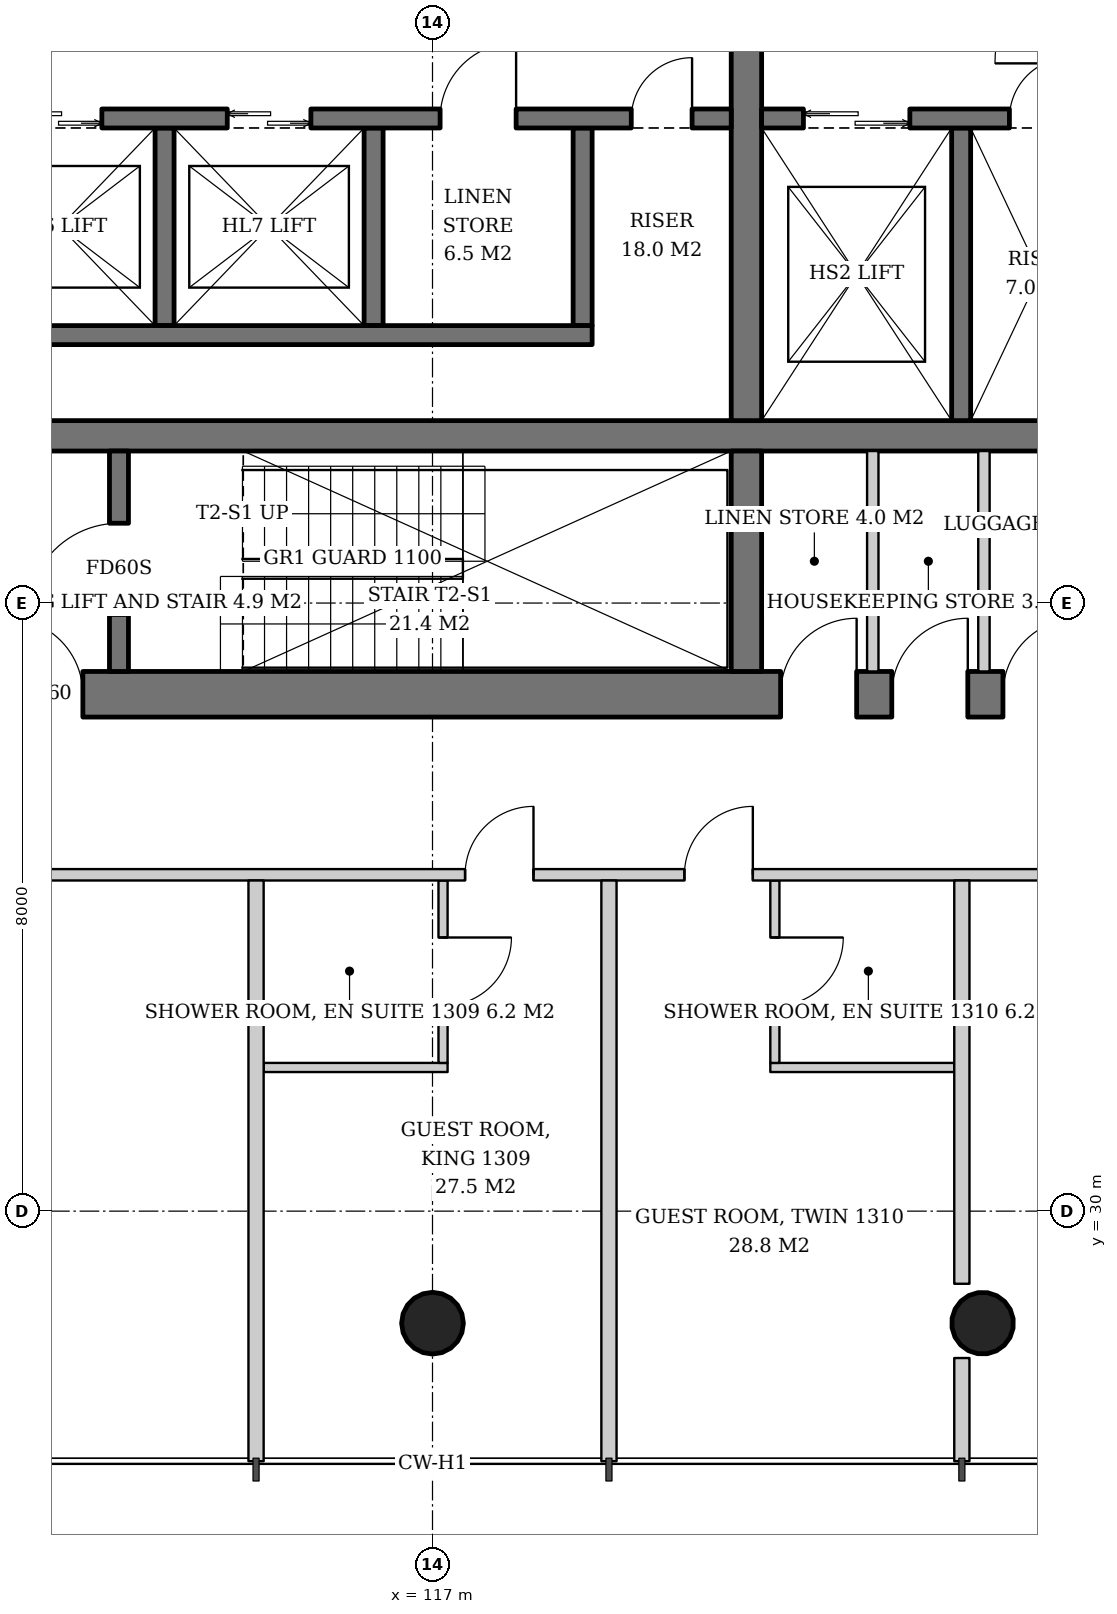
"""IFC4 building model, lengths in metres.
Left out: names, types, materials, properties, quantities, classifications, styles, units other than length and angle.
Written with IfcOpenShell. Run it as: python <this file> out.ifc"""

import sys

from ifc_helpers import new_model, si_unit, direction, frame, frame_2d, origin, origin_2d, place, context, subcontext, project, spatial, rectangle, hollow_circle, extrude, element, fill, save


model = new_model("IFC4")
c1 = context("Model", 3, precision=1e-05, world=origin(), true_north=direction((0.0, 1.0)))
c2 = subcontext(c1, "Body", "Model", "MODEL_VIEW")
j1 = project(units=[si_unit("LENGTHUNIT", "METRE"), si_unit("PLANEANGLEUNIT", "RADIAN")], contexts=[c1])
p1 = place(None, origin())
s1 = spatial("IfcSite", under=j1, at=p1, CompositionType="ELEMENT")
p2 = place(p1, origin())
s2 = spatial("IfcBuilding", under=s1, at=p2, CompositionType="ELEMENT")
p3 = place(p2, frame((0.0, 0.0, 55.2)))
s3 = spatial("IfcBuildingStorey", under=s2, at=p3, CompositionType="ELEMENT", Elevation=55.2)
p4 = place(p3, frame((117.0, 28.474, 0.0), z_axis=(0.0, 0.043069538298, 0.999072076915), x_axis=(-1.0, 0.0, 0.0)))
e1 = element("IfcColumn", 1, at=p4, inside=s3, PredefinedType="COLUMN", context=c2, shape_type="SweptSolid", body=[
    extrude(hollow_circle(Radius=0.406, WallThickness=0.03, at=origin_2d()), origin(), (0.0, 0.0, 1.0), 3.803),
])
p5 = place(p3, frame((124.263, 28.474, 0.0), z_axis=(-0.021497706284, 0.043059584825, 0.998841188968), x_axis=(-0.894693706707, -0.446680166538, 0.0)))
e2 = element("IfcColumn", 2, at=p5, inside=s3, PredefinedType="COLUMN", context=c2, shape_type="SweptSolid", body=[
    extrude(hollow_circle(Radius=0.406, WallThickness=0.03, at=origin_2d()), origin(), (0.0, 0.0, 1.0), 3.804),
])
p6 = place(p3, frame((107.5, 36.8, 0.0), z_axis=(0.0, 0.0, 1.0), x_axis=(1.0, 0.0, 0.0)))
e3 = element("IfcWall", 3, at=p6, inside=s3, PredefinedType="SHEAR", context=c2, shape_type="SweptSolid", body=[
    extrude(rectangle(XDim=19.0, YDim=0.6, at=frame_2d((9.5, 0.0))), origin(), (0.0, 0.0, 1.0), 3.8),
])
p7 = place(p6, frame((3.9, 0.0, 0.0)))
e4 = element("IfcOpeningElement", 4, at=p7, cuts=e3, PredefinedType="OPENING", context=c2, shape_type="SweptSolid", body=[
    extrude(rectangle(XDim=1.0, YDim=2.1, at=frame_2d((0.5, 1.05))), frame((0.0, 0.31, 0.0), z_axis=(0.0, -1.0, 0.0), x_axis=(1.0, 0.0, 0.0)), (0.0, 0.0, 1.0), 0.62),
])
p8 = place(p6, frame((14.08, 0.0, 0.0)))
e5 = element("IfcOpeningElement", 5, at=p8, cuts=e3, PredefinedType="OPENING", context=c2, shape_type="SweptSolid", body=[
    extrude(rectangle(XDim=1.0, YDim=2.1, at=frame_2d((0.5, 1.05))), frame((0.0, 0.31, 0.0), z_axis=(0.0, -1.0, 0.0), x_axis=(1.0, 0.0, 0.0)), (0.0, 0.0, 1.0), 0.62),
])
p9 = place(p6, frame((15.542, 0.0, 0.0)))
e6 = element("IfcOpeningElement", 6, at=p9, cuts=e3, PredefinedType="OPENING", context=c2, shape_type="SweptSolid", body=[
    extrude(rectangle(XDim=1.0, YDim=2.1, at=frame_2d((0.5, 1.05))), frame((0.0, 0.31, 0.0), z_axis=(0.0, -1.0, 0.0), x_axis=(1.0, 0.0, 0.0)), (0.0, 0.0, 1.0), 0.62),
])
p10 = place(p6, frame((17.005, 0.0, 0.0)))
e7 = element("IfcOpeningElement", 7, at=p10, cuts=e3, PredefinedType="OPENING", context=c2, shape_type="SweptSolid", body=[
    extrude(rectangle(XDim=1.0, YDim=2.1, at=frame_2d((0.5, 1.05))), frame((0.0, 0.31, 0.0), z_axis=(0.0, -1.0, 0.0), x_axis=(1.0, 0.0, 0.0)), (0.0, 0.0, 1.0), 0.62),
])
p11 = place(p3, frame((108.1, 40.2, 0.0), z_axis=(0.0, 0.0, 1.0), x_axis=(1.0, 0.0, 0.0)))
e8 = element("IfcWall", 8, at=p11, inside=s3, PredefinedType="SHEAR", context=c2, shape_type="SweptSolid", body=[
    extrude(rectangle(XDim=17.8, YDim=0.4, at=frame_2d((8.9, 0.0))), origin(), (0.0, 0.0, 1.0), 3.8),
])
p12 = place(p3, frame((121.13, 37.1, 0.0), z_axis=(0.0, 0.0, 1.0), x_axis=(0.0, 1.0, 0.0)))
e9 = element("IfcWall", 9, at=p12, inside=s3, PredefinedType="SHEAR", context=c2, shape_type="SweptSolid", body=[
    extrude(rectangle(XDim=2.9, YDim=0.4, at=frame_2d((1.45, 0.0))), origin(), (0.0, 0.0, 1.0), 3.8),
])
p13 = place(p3, frame((121.13, 40.4, 0.0), z_axis=(0.0, 0.0, 1.0), x_axis=(0.0, 1.0, 0.0)))
e10 = element("IfcWall", 10, at=p13, inside=s3, PredefinedType="SHEAR", context=c2, shape_type="SweptSolid", body=[
    extrude(rectangle(XDim=11.2, YDim=0.4, at=frame_2d((5.6, 0.0))), origin(), (0.0, 0.0, 1.0), 3.8),
])
p14 = place(p3, frame((112.875, 37.1, 0.0), z_axis=(0.0, 0.0, 1.0), x_axis=(0.0, 1.0, 0.0)))
e11 = element("IfcWall", 11, at=p14, inside=s3, PredefinedType="SHEAR", context=c2, shape_type="SweptSolid", body=[
    extrude(rectangle(XDim=2.9, YDim=0.25, at=frame_2d((1.45, 0.0))), origin(), (0.0, 0.0, 1.0), 3.8),
])
p15 = place(p14, frame((0.75, 0.0, 0.0)))
e12 = element("IfcOpeningElement", 12, at=p15, cuts=e11, PredefinedType="OPENING", context=c2, shape_type="SweptSolid", body=[
    extrude(rectangle(XDim=1.2, YDim=2.1, at=frame_2d((0.6, 1.05))), frame((0.0, 0.135, 0.0), z_axis=(0.0, -1.0, 0.0), x_axis=(1.0, 0.0, 0.0)), (0.0, 0.0, 1.0), 0.27),
])
for number, where, z_axis, x_axis in (
    (13, (113.475, 44.25, 0.0), (0.0, 0.0, 1.0), (0.0, -1.0, 0.0)),
    (14, (116.225, 44.25, 0.0), (0.0, 0.0, 1.0), (0.0, -1.0, 0.0)),
    (15, (118.975, 44.25, 0.0), (0.0, 0.0, 1.0), (0.0, -1.0, 0.0)),
):
    element("IfcWall", number, at=place(p3, frame(where, z_axis=z_axis, x_axis=x_axis)), inside=s3, PredefinedType="SHEAR", context=c2, shape_type="SweptSolid", body=[
        extrude(rectangle(XDim=2.6, YDim=0.25, at=frame_2d((1.3, 0.0))), origin(), (0.0, 0.0, 1.0), 3.8),
    ])
p16 = place(p3, frame((108.1, 41.525, 0.0), z_axis=(0.0, 0.0, 1.0), x_axis=(1.0, 0.0, 0.0)))
e16 = element("IfcWall", 16, at=p16, inside=s3, PredefinedType="SHEAR", context=c2, shape_type="SweptSolid", body=[
    extrude(rectangle(XDim=11.0, YDim=0.25, at=frame_2d((5.5, 0.0))), origin(), (0.0, 0.0, 1.0), 3.8),
])
p17 = place(p3, frame((108.1, 44.375, 0.0), z_axis=(0.0, 0.0, 1.0), x_axis=(1.0, 0.0, 0.0)))
e17 = element("IfcWall", 17, at=p17, inside=s3, PredefinedType="SHEAR", context=c2, shape_type="SweptSolid", body=[
    extrude(rectangle(XDim=12.83, YDim=0.25, at=frame_2d((6.415, 0.0))), origin(), (0.0, 0.0, 1.0), 3.8),
])
p18 = place(p17, frame((0.7, 0.0, 0.0)))
e18 = element("IfcOpeningElement", 18, at=p18, cuts=e17, PredefinedType="OPENING", context=c2, shape_type="SweptSolid", body=[
    extrude(rectangle(XDim=1.1, YDim=2.2, at=frame_2d((0.55, 1.1))), frame((0.0, 0.135, 0.0), z_axis=(0.0, -1.0, 0.0), x_axis=(1.0, 0.0, 0.0)), (0.0, 0.0, 1.0), 0.27),
])
p19 = place(p17, frame((3.45, 0.0, 0.0)))
e19 = element("IfcOpeningElement", 19, at=p19, cuts=e17, PredefinedType="OPENING", context=c2, shape_type="SweptSolid", body=[
    extrude(rectangle(XDim=1.1, YDim=2.2, at=frame_2d((0.55, 1.1))), frame((0.0, 0.135, 0.0), z_axis=(0.0, -1.0, 0.0), x_axis=(1.0, 0.0, 0.0)), (0.0, 0.0, 1.0), 0.27),
])
p20 = place(p17, frame((6.2, 0.0, 0.0)))
e20 = element("IfcOpeningElement", 20, at=p20, cuts=e17, PredefinedType="OPENING", context=c2, shape_type="SweptSolid", body=[
    extrude(rectangle(XDim=1.1, YDim=2.2, at=frame_2d((0.55, 1.1))), frame((0.0, 0.135, 0.0), z_axis=(0.0, -1.0, 0.0), x_axis=(1.0, 0.0, 0.0)), (0.0, 0.0, 1.0), 0.27),
])
p21 = place(p17, frame((9.0, 0.0, 0.0)))
e21 = element("IfcOpeningElement", 21, at=p21, cuts=e17, PredefinedType="OPENING", context=c2, shape_type="SweptSolid", body=[
    extrude(rectangle(XDim=1.0, YDim=2.1, at=frame_2d((0.5, 1.05))), frame((0.0, 0.135, 0.0), z_axis=(0.0, -1.0, 0.0), x_axis=(1.0, 0.0, 0.0)), (0.0, 0.0, 1.0), 0.27),
])
p22 = place(p17, frame((11.515, 0.0, 0.0)))
e22 = element("IfcOpeningElement", 22, at=p22, cuts=e17, PredefinedType="OPENING", context=c2, shape_type="SweptSolid", body=[
    extrude(rectangle(XDim=0.8, YDim=2.0, at=frame_2d((0.4, 1.0))), frame((0.0, 0.135, 0.0), z_axis=(0.0, -1.0, 0.0), x_axis=(1.0, 0.0, 0.0)), (0.0, 0.0, 1.0), 0.27),
])
p23 = place(p3, frame((123.955, 44.25, 0.0), z_axis=(0.0, 0.0, 1.0), x_axis=(0.0, -1.0, 0.0)))
e23 = element("IfcWall", 23, at=p23, inside=s3, PredefinedType="SHEAR", context=c2, shape_type="SweptSolid", body=[
    extrude(rectangle(XDim=3.85, YDim=0.25, at=frame_2d((1.925, 0.0))), origin(), (0.0, 0.0, 1.0), 3.8),
])
p24 = place(p3, frame((121.33, 44.375, 0.0), z_axis=(0.0, 0.0, 1.0), x_axis=(1.0, 0.0, 0.0)))
e24 = element("IfcWall", 24, at=p24, inside=s3, PredefinedType="SHEAR", context=c2, shape_type="SweptSolid", body=[
    extrude(rectangle(XDim=4.57, YDim=0.25, at=frame_2d((2.285, 0.0))), origin(), (0.0, 0.0, 1.0), 3.8),
])
p25 = place(p24, frame((0.55, 0.0, 0.0)))
e25 = element("IfcOpeningElement", 25, at=p25, cuts=e24, PredefinedType="OPENING", context=c2, shape_type="SweptSolid", body=[
    extrude(rectangle(XDim=1.4, YDim=2.4, at=frame_2d((0.7, 1.2))), frame((0.0, 0.135, 0.0), z_axis=(0.0, -1.0, 0.0), x_axis=(1.0, 0.0, 0.0)), (0.0, 0.0, 1.0), 0.27),
])
p26 = place(p24, frame((3.26, 0.0, 0.0)))
e26 = element("IfcOpeningElement", 26, at=p26, cuts=e24, PredefinedType="OPENING", context=c2, shape_type="SweptSolid", body=[
    extrude(rectangle(XDim=0.8, YDim=2.0, at=frame_2d((0.4, 1.0))), frame((0.0, 0.135, 0.0), z_axis=(0.0, -1.0, 0.0), x_axis=(1.0, 0.0, 0.0)), (0.0, 0.0, 1.0), 0.27),
])
for number, where, z_axis, x_axis in (
    (27, (122.792, 37.1, 0.0), (0.0, 0.0, 1.0), (0.0, 1.0, 0.0)),
    (28, (124.255, 37.1, 0.0), (0.0, 0.0, 1.0), (0.0, 1.0, 0.0)),
):
    element("IfcWall", number, at=place(p3, frame(where, z_axis=z_axis, x_axis=x_axis)), inside=s3, PredefinedType="SOLIDWALL", context=c2, shape_type="SweptSolid", body=[
        extrude(rectangle(XDim=2.9, YDim=0.15, at=frame_2d((1.45, 0.0))), origin(), (0.0, 0.0, 1.0), 3.6),
    ])
p27 = place(p3, frame((114.779, 31.89, 0.0), z_axis=(0.0, 0.0, 1.0), x_axis=(1.0, 0.0, 0.0)))
e29 = element("IfcWall", 29, at=p27, inside=s3, PredefinedType="PARTITIONING", context=c2, shape_type="SweptSolid", body=[
    extrude(rectangle(XDim=2.42, YDim=0.12, at=frame_2d((1.21, 0.0))), origin(), (0.0, 0.0, 1.0), 2.847),
])
p28 = place(p3, frame((117.139, 34.35, 0.0), z_axis=(0.0, 0.0, 1.0), x_axis=(0.0, -1.0, 0.0)))
e30 = element("IfcWall", 30, at=p28, inside=s3, PredefinedType="PARTITIONING", context=c2, shape_type="SweptSolid", body=[
    extrude(rectangle(XDim=2.4, YDim=0.12, at=frame_2d((1.2, 0.0))), origin(), (0.0, 0.0, 1.0), 3.6),
])
p29 = place(p28, frame((0.75, 0.0, 0.0)))
e31 = element("IfcOpeningElement", 31, at=p29, cuts=e30, PredefinedType="OPENING", context=c2, shape_type="SweptSolid", body=[
    extrude(rectangle(XDim=0.9, YDim=2.1, at=frame_2d((0.45, 1.05))), frame((0.0, 0.07, 0.0), z_axis=(0.0, -1.0, 0.0), x_axis=(1.0, 0.0, 0.0)), (0.0, 0.0, 1.0), 0.14),
])
p30 = place(p3, frame((121.444, 31.89, 0.0), z_axis=(0.0, 0.0, 1.0), x_axis=(1.0, 0.0, 0.0)))
e32 = element("IfcWall", 32, at=p30, inside=s3, PredefinedType="PARTITIONING", context=c2, shape_type="SweptSolid", body=[
    extrude(rectangle(XDim=2.42, YDim=0.12, at=frame_2d((1.21, 0.0))), origin(), (0.0, 0.0, 1.0), 3.6),
])
p31 = place(p3, frame((121.504, 34.35, 0.0), z_axis=(0.0, 0.0, 1.0), x_axis=(0.0, -1.0, 0.0)))
e33 = element("IfcWall", 33, at=p31, inside=s3, PredefinedType="PARTITIONING", context=c2, shape_type="SweptSolid", body=[
    extrude(rectangle(XDim=2.4, YDim=0.12, at=frame_2d((1.2, 0.0))), origin(), (0.0, 0.0, 1.0), 3.6),
])
p32 = place(p31, frame((0.75, 0.0, 0.0)))
e34 = element("IfcOpeningElement", 34, at=p32, cuts=e33, PredefinedType="OPENING", context=c2, shape_type="SweptSolid", body=[
    extrude(rectangle(XDim=0.9, YDim=2.1, at=frame_2d((0.45, 1.05))), frame((0.0, 0.07, 0.0), z_axis=(0.0, -1.0, 0.0), x_axis=(1.0, 0.0, 0.0)), (0.0, 0.0, 1.0), 0.14),
])
p33 = place(p3, frame((105.35, 34.425, 0.0), z_axis=(0.0, 0.0, 1.0), x_axis=(1.0, 0.0, 0.0)))
e35 = element("IfcWall", 35, at=p33, inside=s3, PredefinedType="PARTITIONING", context=c2, shape_type="SweptSolid", body=[
    extrude(rectangle(XDim=23.15, YDim=0.15, at=frame_2d((11.575, 0.0))), origin(), (0.0, 0.0, 1.0), 2.8),
])
p34 = place(p33, frame((1.918, 0.0, 0.0)))
e36 = element("IfcOpeningElement", 36, at=p34, cuts=e35, PredefinedType="OPENING", context=c2, shape_type="SweptSolid", body=[
    extrude(rectangle(XDim=0.9, YDim=2.1, at=frame_2d((0.45, 1.05))), frame((0.0, 0.085, 0.0), z_axis=(0.0, -1.0, 0.0), x_axis=(1.0, 0.0, 0.0)), (0.0, 0.0, 1.0), 0.17),
])
p35 = place(p33, frame((12.079, 0.0, 0.0)))
e37 = element("IfcOpeningElement", 37, at=p35, cuts=e35, PredefinedType="OPENING", context=c2, shape_type="SweptSolid", body=[
    extrude(rectangle(XDim=0.9, YDim=2.1, at=frame_2d((0.45, 1.05))), frame((0.0, 0.085, 0.0), z_axis=(0.0, -1.0, 0.0), x_axis=(1.0, 0.0, 0.0)), (0.0, 0.0, 1.0), 0.17),
])
p36 = place(p33, frame((14.964, 0.0, 0.0)))
e38 = element("IfcOpeningElement", 38, at=p36, cuts=e35, PredefinedType="OPENING", context=c2, shape_type="SweptSolid", body=[
    extrude(rectangle(XDim=0.9, YDim=2.1, at=frame_2d((0.45, 1.05))), frame((0.0, 0.085, 0.0), z_axis=(0.0, -1.0, 0.0), x_axis=(1.0, 0.0, 0.0)), (0.0, 0.0, 1.0), 0.17),
])
for number, where, z_axis, x_axis in (
    (39, (114.678, 34.35, 0.0), (0.0, 0.0, 1.0), (0.0, -1.0, 0.0)),
    (40, (119.322, 34.35, 0.0), (0.0, 0.0, 1.0), (0.0, -1.0, 0.0)),
):
    element("IfcWall", number, at=place(p3, frame(where, z_axis=z_axis, x_axis=x_axis)), inside=s3, PredefinedType="PARTITIONING", context=c2, shape_type="SweptSolid", body=[
        extrude(rectangle(XDim=7.64, YDim=0.2, at=frame_2d((3.82, 0.0))), origin(), (0.0, 0.0, 1.0), 3.05),
    ])
p37 = place(p3, frame((123.964, 34.35, 0.0), z_axis=(0.0, 0.0, 1.0), x_axis=(0.0, -1.0, 0.0)))
e41 = element("IfcWall", 41, at=p37, inside=s3, PredefinedType="PARTITIONING", context=c2, shape_type="SweptSolid", body=[
    extrude(rectangle(XDim=5.306, YDim=0.2, at=frame_2d((2.653, 0.0))), origin(), (0.0, 0.0, 1.0), 3.6),
])
p38 = place(p3, frame((123.964, 28.068, 0.0), z_axis=(0.0, 0.0, 1.0), x_axis=(0.0, -1.0, 0.0)))
e42 = element("IfcWall", 42, at=p38, inside=s3, PredefinedType="PARTITIONING", context=c2, shape_type="SweptSolid", body=[
    extrude(rectangle(XDim=1.358, YDim=0.2, at=frame_2d((0.679, 0.0))), origin(), (0.0, 0.0, 1.0), 3.6),
])
p39 = place(p15, origin())
e43 = element("IfcDoor", 43, at=p39, inside=s3, OperationType="SINGLE_SWING_LEFT", PredefinedType="DOOR", context=c2, shape_type="SweptSolid", body=[
    extrude(rectangle(XDim=1.2, YDim=2.1, at=frame_2d((0.6, 1.05))), frame((0.0, 0.025, 0.0), z_axis=(0.0, -1.0, 0.0), x_axis=(1.0, 0.0, 0.0)), (0.0, 0.0, 1.0), 0.05),
])
fill(e12, e43)
p40 = place(p19, origin())
e44 = element("IfcDoor", 44, at=p40, inside=s3, OperationType="DOUBLE_DOOR_SLIDING", PredefinedType="DOOR", context=c2, shape_type="SweptSolid", body=[
    extrude(rectangle(XDim=1.1, YDim=2.2, at=frame_2d((0.55, 1.1))), frame((0.0, 0.025, 0.0), z_axis=(0.0, -1.0, 0.0), x_axis=(1.0, 0.0, 0.0)), (0.0, 0.0, 1.0), 0.05),
])
fill(e19, e44)
p41 = place(p20, origin())
e45 = element("IfcDoor", 45, at=p41, inside=s3, OperationType="DOUBLE_DOOR_SLIDING", PredefinedType="DOOR", context=c2, shape_type="SweptSolid", body=[
    extrude(rectangle(XDim=1.1, YDim=2.2, at=frame_2d((0.55, 1.1))), frame((0.0, 0.025, 0.0), z_axis=(0.0, -1.0, 0.0), x_axis=(1.0, 0.0, 0.0)), (0.0, 0.0, 1.0), 0.05),
])
fill(e20, e45)
p42 = place(p21, origin())
e46 = element("IfcDoor", 46, at=p42, inside=s3, OperationType="SINGLE_SWING_RIGHT", PredefinedType="DOOR", context=c2, shape_type="SweptSolid", body=[
    extrude(rectangle(XDim=1.0, YDim=2.1, at=frame_2d((0.5, 1.05))), frame((0.0, 0.025, 0.0), z_axis=(0.0, -1.0, 0.0), x_axis=(1.0, 0.0, 0.0)), (0.0, 0.0, 1.0), 0.05),
])
fill(e21, e46)
p43 = place(p22, origin())
e47 = element("IfcDoor", 47, at=p43, inside=s3, OperationType="SINGLE_SWING_RIGHT", PredefinedType="DOOR", context=c2, shape_type="SweptSolid", body=[
    extrude(rectangle(XDim=0.8, YDim=2.0, at=frame_2d((0.4, 1.0))), frame((0.0, 0.025, 0.0), z_axis=(0.0, -1.0, 0.0), x_axis=(1.0, 0.0, 0.0)), (0.0, 0.0, 1.0), 0.05),
])
fill(e22, e47)
p44 = place(p25, origin())
e48 = element("IfcDoor", 48, at=p44, inside=s3, OperationType="DOUBLE_DOOR_SLIDING", PredefinedType="DOOR", context=c2, shape_type="SweptSolid", body=[
    extrude(rectangle(XDim=1.4, YDim=2.4, at=frame_2d((0.7, 1.2))), frame((0.0, 0.025, 0.0), z_axis=(0.0, -1.0, 0.0), x_axis=(1.0, 0.0, 0.0)), (0.0, 0.0, 1.0), 0.05),
])
fill(e25, e48)
p45 = place(p26, origin())
e49 = element("IfcDoor", 49, at=p45, inside=s3, OperationType="SINGLE_SWING_RIGHT", PredefinedType="DOOR", context=c2, shape_type="SweptSolid", body=[
    extrude(rectangle(XDim=0.8, YDim=2.0, at=frame_2d((0.4, 1.0))), frame((0.0, 0.025, 0.0), z_axis=(0.0, -1.0, 0.0), x_axis=(1.0, 0.0, 0.0)), (0.0, 0.0, 1.0), 0.05),
])
fill(e26, e49)
p46 = place(p7, origin())
e50 = element("IfcDoor", 50, at=p46, inside=s3, OperationType="SINGLE_SWING_LEFT", PredefinedType="DOOR", context=c2, shape_type="SweptSolid", body=[
    extrude(rectangle(XDim=1.0, YDim=2.1, at=frame_2d((0.5, 1.05))), frame((0.0, 0.025, 0.0), z_axis=(0.0, -1.0, 0.0), x_axis=(1.0, 0.0, 0.0)), (0.0, 0.0, 1.0), 0.05),
])
fill(e4, e50)
p47 = place(p8, origin())
e51 = element("IfcDoor", 51, at=p47, inside=s3, OperationType="SINGLE_SWING_RIGHT", PredefinedType="DOOR", context=c2, shape_type="SweptSolid", body=[
    extrude(rectangle(XDim=1.0, YDim=2.1, at=frame_2d((0.5, 1.05))), frame((0.0, 0.29, 0.0), z_axis=(0.0, -1.0, 0.0), x_axis=(1.0, 0.0, 0.0)), (0.0, 0.0, 1.0), 0.05),
])
fill(e5, e51)
p48 = place(p9, origin())
e52 = element("IfcDoor", 52, at=p48, inside=s3, OperationType="SINGLE_SWING_RIGHT", PredefinedType="DOOR", context=c2, shape_type="SweptSolid", body=[
    extrude(rectangle(XDim=1.0, YDim=2.1, at=frame_2d((0.5, 1.05))), frame((0.0, 0.29, 0.0), z_axis=(0.0, -1.0, 0.0), x_axis=(1.0, 0.0, 0.0)), (0.0, 0.0, 1.0), 0.05),
])
fill(e6, e52)
p49 = place(p10, origin())
e53 = element("IfcDoor", 53, at=p49, inside=s3, OperationType="SINGLE_SWING_RIGHT", PredefinedType="DOOR", context=c2, shape_type="SweptSolid", body=[
    extrude(rectangle(XDim=1.0, YDim=2.1, at=frame_2d((0.5, 1.05))), frame((0.0, 0.29, 0.0), z_axis=(0.0, -1.0, 0.0), x_axis=(1.0, 0.0, 0.0)), (0.0, 0.0, 1.0), 0.05),
])
fill(e7, e53)
p50 = place(p29, origin())
e54 = element("IfcDoor", 54, at=p50, inside=s3, OperationType="SINGLE_SWING_LEFT", PredefinedType="DOOR", context=c2, shape_type="SweptSolid", body=[
    extrude(rectangle(XDim=0.9, YDim=2.1, at=frame_2d((0.45, 1.05))), frame((0.0, 0.025, 0.0), z_axis=(0.0, -1.0, 0.0), x_axis=(1.0, 0.0, 0.0)), (0.0, 0.0, 1.0), 0.05),
])
fill(e31, e54)
p51 = place(p32, origin())
e55 = element("IfcDoor", 55, at=p51, inside=s3, OperationType="SINGLE_SWING_LEFT", PredefinedType="DOOR", context=c2, shape_type="SweptSolid", body=[
    extrude(rectangle(XDim=0.9, YDim=2.1, at=frame_2d((0.45, 1.05))), frame((0.0, 0.025, 0.0), z_axis=(0.0, -1.0, 0.0), x_axis=(1.0, 0.0, 0.0)), (0.0, 0.0, 1.0), 0.05),
])
fill(e34, e55)
p52 = place(p35, origin())
e56 = element("IfcDoor", 56, at=p52, inside=s3, OperationType="SINGLE_SWING_RIGHT", PredefinedType="DOOR", context=c2, shape_type="SweptSolid", body=[
    extrude(rectangle(XDim=0.9, YDim=2.1, at=frame_2d((0.45, 1.05))), frame((0.0, 0.025, 0.0), z_axis=(0.0, -1.0, 0.0), x_axis=(1.0, 0.0, 0.0)), (0.0, 0.0, 1.0), 0.05),
])
fill(e37, e56)
p53 = place(p36, origin())
e57 = element("IfcDoor", 57, at=p53, inside=s3, OperationType="SINGLE_SWING_RIGHT", PredefinedType="DOOR", context=c2, shape_type="SweptSolid", body=[
    extrude(rectangle(XDim=0.9, YDim=2.1, at=frame_2d((0.45, 1.05))), frame((0.0, 0.025, 0.0), z_axis=(0.0, -1.0, 0.0), x_axis=(1.0, 0.0, 0.0)), (0.0, 0.0, 1.0), 0.05),
])
fill(e38, e57)
save(model, sys.argv[1])
